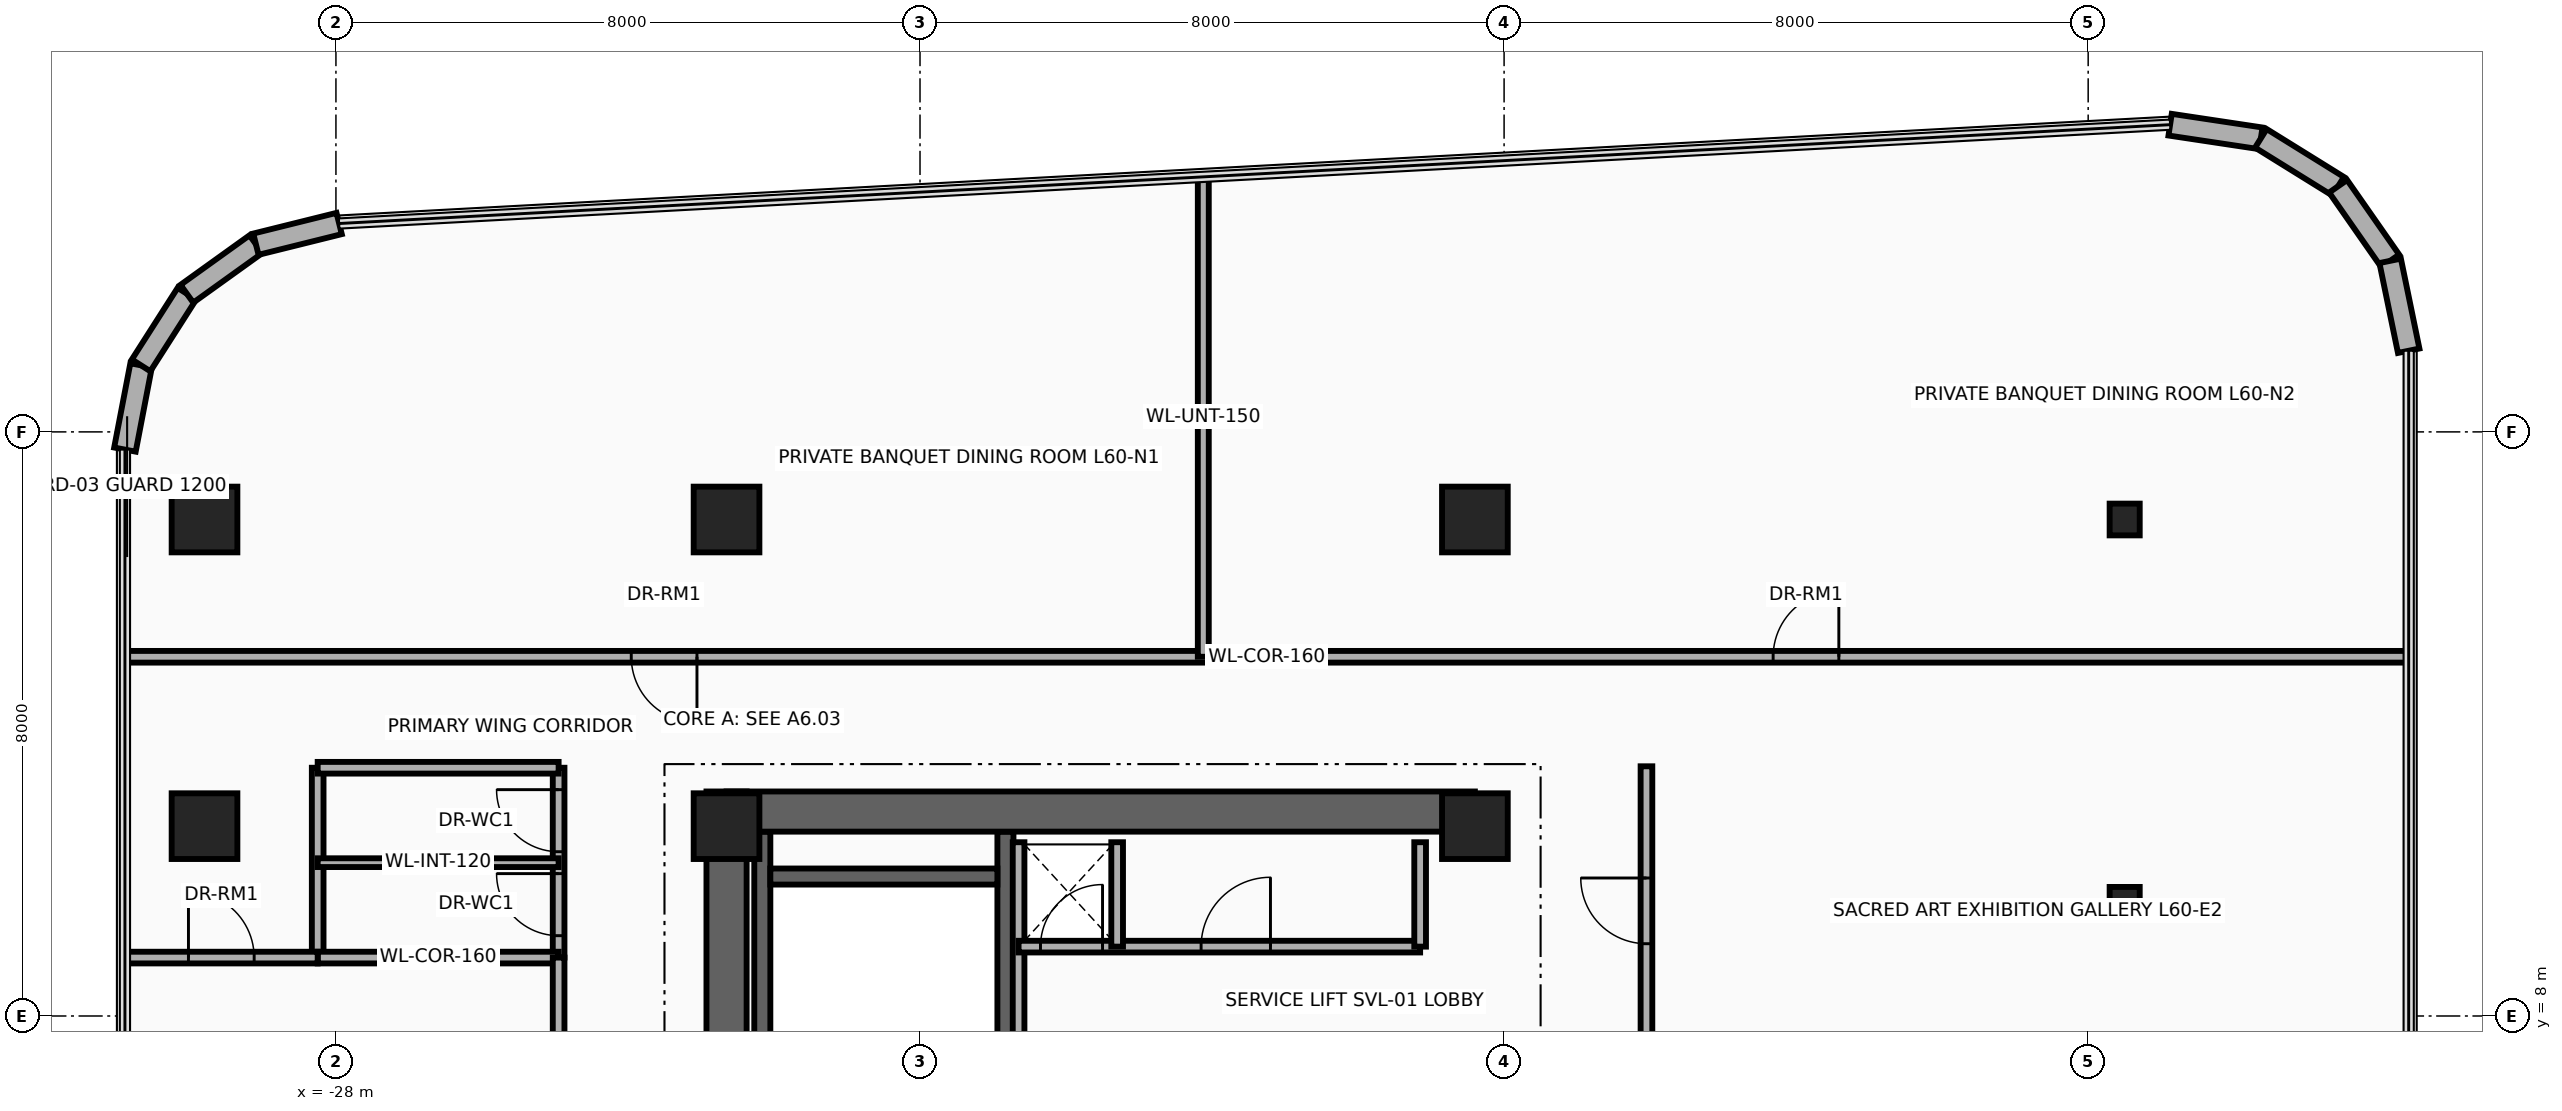
"""IFC4 building model, lengths in metres.
Left out: names, types, materials, properties, quantities, classifications, styles, units other than length and angle.
Written with IfcOpenShell. Run it as: python <this file> out.ifc"""

import sys

from ifc_helpers import new_model, si_unit, direction, frame, frame_2d, origin, origin_2d, place, context, subcontext, project, spatial, rectangle, i_section, extrude, source, transform, mapped, element, fill, save


model = new_model("IFC4")
c1 = context("Model", 3, precision=1e-05, world=origin(), true_north=direction((0.0, 1.0)))
c2 = subcontext(c1, "Body", "Model", "MODEL_VIEW")
j1 = project(units=[si_unit("LENGTHUNIT", "METRE"), si_unit("PLANEANGLEUNIT", "RADIAN")], contexts=[c1])
p1 = place(None, origin())
s1 = spatial("IfcSite", under=j1, at=p1, CompositionType="ELEMENT")
p2 = place(p1, origin())
s2 = spatial("IfcBuilding", under=s1, at=p2, CompositionType="ELEMENT")
p3 = place(p2, frame((0.0, 0.0, 233.5)))
s3 = spatial("IfcBuildingStorey", under=s2, at=p3, CompositionType="ELEMENT", Elevation=233.5)
for number, where, z_axis, x_axis in (
    (1, (-22.16, 1.78, 0.0), (0.0, 0.0, 1.0), (0.0, 1.0, 0.0)),
    (2, (-18.83, 1.78, 0.0), (0.0, 0.0, 1.0), (0.0, 1.0, 0.0)),
):
    element("IfcWall", number, at=place(p3, frame(where, z_axis=z_axis, x_axis=x_axis)), inside=s3, PredefinedType="SHEAR", context=c2, shape_type="SweptSolid", body=[
        extrude(rectangle(XDim=8.745, YDim=0.22, at=frame_2d((4.373, 0.0))), origin(), (0.0, 0.0, 1.0), 3.26),
    ])
p4 = place(p3, frame((-22.05, 9.91, 0.0), z_axis=(0.0, 0.0, 1.0), x_axis=(1.0, 0.0, 0.0)))
e3 = element("IfcWall", 3, at=p4, inside=s3, PredefinedType="SHEAR", context=c2, shape_type="SweptSolid", body=[
    extrude(rectangle(XDim=3.11, YDim=0.22, at=frame_2d((1.555, 0.0))), origin(), (0.0, 0.0, 1.0), 3.26),
])
p5 = place(p3, frame((-22.65, -11.075, 0.0), z_axis=(0.0, 0.0, 1.0), x_axis=(0.0, 1.0, 0.0)))
e4 = element("IfcWall", 4, at=p5, inside=s3, PredefinedType="SHEAR", context=c2, shape_type="SweptSolid", body=[
    extrude(rectangle(XDim=22.15, YDim=0.55, at=frame_2d((11.075, 0.0))), origin(), (0.0, 0.0, 1.0), 3.26),
])
p6 = place(p3, frame((-22.65, 10.8, 0.0), z_axis=(0.0, 0.0, 1.0), x_axis=(1.0, 0.0, 0.0)))
e5 = element("IfcWall", 5, at=p6, inside=s3, PredefinedType="SHEAR", context=c2, shape_type="SweptSolid", body=[
    extrude(rectangle(XDim=10.25, YDim=0.55, at=frame_2d((5.125, 0.0))), origin(), (0.0, 0.0, 1.0), 3.26),
])
m1 = source(origin(), c2, "Body", "SweptSolid", [
    extrude(rectangle(XDim=0.9, YDim=0.9, at=origin_2d()), origin(), (0.0, 0.0, 1.0), 3.5),
])
for number, where, z_axis, x_axis in (
    (6, (-29.8, 10.6, 0.0), (0.0, 0.0, 1.0), (1.0, 0.0, 0.0)),
    (7, (-22.65, 10.6, 0.0), (0.0, 0.0, 1.0), (1.0, 0.0, 0.0)),
    (8, (-12.4, 10.6, 0.0), (0.0, 0.0, 1.0), (1.0, 0.0, 0.0)),
    (9, (-29.8, 14.8, 0.0), (0.0, 0.0, 1.0), (1.0, 0.0, 0.0)),
    (10, (-22.65, 14.8, 0.0), (0.0, 0.0, 1.0), (1.0, 0.0, 0.0)),
    (11, (-12.4, 14.8, 0.0), (0.0, 0.0, 1.0), (1.0, 0.0, 0.0)),
):
    element("IfcColumn", number, at=place(p3, frame(where, z_axis=z_axis, x_axis=x_axis)), inside=s3, PredefinedType="COLUMN", context=c2, shape_type="MappedRepresentation", body=[
        mapped(m1, transform((0.0, 0.0, 0.0), x_axis=(1.0, 0.0, 0.0), y_axis=(0.0, 1.0, 0.0), z_axis=(0.0, 0.0, 1.0), scale=1.0)),
    ])
m2 = source(origin(), c2, "Body", "SweptSolid", [
    extrude(i_section(OverallWidth=0.412, OverallDepth=0.435, WebThickness=0.036, FlangeThickness=0.057, at=origin_2d()), origin(), (0.0, 0.0, 1.0), 3.5),
])
for number, where, z_axis, x_axis in (
    (12, (-3.5, 9.55, 0.0), (0.0, 0.0, 1.0), (1.0, 0.0, 0.0)),
    (13, (-3.5, 14.8, 0.0), (0.0, 0.0, 1.0), (1.0, 0.0, 0.0)),
):
    element("IfcColumn", number, at=place(p3, frame(where, z_axis=z_axis, x_axis=x_axis)), inside=s3, PredefinedType="COLUMN", context=c2, shape_type="MappedRepresentation", body=[
        mapped(m2, transform((0.0, 0.0, 0.0), x_axis=(1.0, 0.0, 0.0), y_axis=(0.0, 1.0, 0.0), z_axis=(0.0, 0.0, 1.0), scale=1.0)),
    ])
p7 = place(p3, frame((-30.89, 15.758, 0.0), z_axis=(0.0, 0.0, 1.0), x_axis=(0.18831542659, 0.982108598938, 0.0)))
e14 = element("IfcWall", 14, at=p7, inside=s3, PredefinedType="SOLIDWALL", context=c2, shape_type="SweptSolid", body=[
    extrude(rectangle(XDim=1.175, YDim=0.3, at=frame_2d((0.587, 0.0))), origin(), (0.0, 0.0, 1.0), 3.26),
])
p8 = place(p3, frame((-30.669, 16.911, 0.0), z_axis=(0.0, 0.0, 1.0), x_axis=(0.538678781902, 0.84251122837, 0.0)))
e15 = element("IfcWall", 15, at=p8, inside=s3, PredefinedType="SOLIDWALL", context=c2, shape_type="SweptSolid", body=[
    extrude(rectangle(XDim=1.164, YDim=0.3, at=frame_2d((0.582, 0.0))), origin(), (0.0, 0.0, 1.0), 3.26),
])
p9 = place(p3, frame((-30.042, 17.892, 0.0), z_axis=(0.0, 0.0, 1.0), x_axis=(0.812313539683, 0.583220981487, 0.0)))
e16 = element("IfcWall", 16, at=p9, inside=s3, PredefinedType="SOLIDWALL", context=c2, shape_type="SweptSolid", body=[
    extrude(rectangle(XDim=1.164, YDim=0.3, at=frame_2d((0.582, 0.0))), origin(), (0.0, 0.0, 1.0), 3.26),
])
p10 = place(p3, frame((-29.096, 18.571, 0.0), z_axis=(0.0, 0.0, 1.0), x_axis=(0.97050812798, 0.241068400098, 0.0)))
e17 = element("IfcWall", 17, at=p10, inside=s3, PredefinedType="SOLIDWALL", context=c2, shape_type="SweptSolid", body=[
    extrude(rectangle(XDim=1.175, YDim=0.3, at=frame_2d((0.587, 0.0))), origin(), (0.0, 0.0, 1.0), 3.26),
])
p11 = place(p3, frame((-2.878, 20.208, 0.0), z_axis=(0.0, 0.0, 1.0), x_axis=(0.988902138571, -0.148568369208, 0.0)))
e18 = element("IfcWall", 18, at=p11, inside=s3, PredefinedType="SOLIDWALL", context=c2, shape_type="SweptSolid", body=[
    extrude(rectangle(XDim=1.257, YDim=0.3, at=frame_2d((0.628, 0.0))), origin(), (0.0, 0.0, 1.0), 3.26),
])
p12 = place(p3, frame((-1.635, 20.021, 0.0), z_axis=(0.0, 0.0, 1.0), x_axis=(0.849646224094, -0.52735310171, 0.0)))
e19 = element("IfcWall", 19, at=p12, inside=s3, PredefinedType="SOLIDWALL", context=c2, shape_type="SweptSolid", body=[
    extrude(rectangle(XDim=1.245, YDim=0.3, at=frame_2d((0.623, 0.0))), origin(), (0.0, 0.0, 1.0), 3.26),
])
p13 = place(p3, frame((-0.576, 19.364, 0.0), z_axis=(0.0, 0.0, 1.0), x_axis=(0.572304219931, -0.820041389107, 0.0)))
e20 = element("IfcWall", 20, at=p13, inside=s3, PredefinedType="SOLIDWALL", context=c2, shape_type="SweptSolid", body=[
    extrude(rectangle(XDim=1.246, YDim=0.3, at=frame_2d((0.623, 0.0))), origin(), (0.0, 0.0, 1.0), 3.26),
])
p14 = place(p3, frame((0.136, 18.343, 0.0), z_axis=(0.0, 0.0, 1.0), x_axis=(0.201603599025, -0.979467196419, 0.0)))
e21 = element("IfcWall", 21, at=p14, inside=s3, PredefinedType="SOLIDWALL", context=c2, shape_type="SweptSolid", body=[
    extrude(rectangle(XDim=1.257, YDim=0.3, at=frame_2d((0.628, 0.0))), origin(), (0.0, 0.0, 1.0), 3.26),
])
p15 = place(p3, frame((-18.65, 7.45, 0.0), z_axis=(0.0, 0.0, 1.0), x_axis=(0.0, 1.0, 0.0)))
e22 = element("IfcWall", 22, at=p15, inside=s3, PredefinedType="PARTITIONING", context=c2, shape_type="SweptSolid", body=[
    extrude(rectangle(XDim=2.93, YDim=0.16, at=frame_2d((1.465, 0.0))), origin(), (0.0, 0.0, 1.0), 3.26),
])
p16 = place(p3, frame((-18.65, 8.95, 0.0), z_axis=(0.0, 0.0, 1.0), x_axis=(1.0, 0.0, 0.0)))
e23 = element("IfcWall", 23, at=p16, inside=s3, PredefinedType="PARTITIONING", context=c2, shape_type="SweptSolid", body=[
    extrude(rectangle(XDim=5.5, YDim=0.16, at=frame_2d((2.75, 0.0))), origin(), (0.0, 0.0, 1.0), 3.26),
])
p17 = place(p16, frame((0.3, 0.0, 0.0)))
e24 = element("IfcOpeningElement", 24, at=p17, cuts=e23, PredefinedType="OPENING", context=c2, shape_type="SweptSolid", body=[
    extrude(rectangle(XDim=0.85, YDim=2.05, at=frame_2d((0.425, 1.025))), frame((0.0, 0.095, 0.0), z_axis=(0.0, -1.0, 0.0), x_axis=(1.0, 0.0, 0.0)), (0.0, 0.0, 1.0), 0.19),
])
p18 = place(p16, frame((2.5, 0.0, 0.0)))
e25 = element("IfcOpeningElement", 25, at=p18, cuts=e23, PredefinedType="OPENING", context=c2, shape_type="SweptSolid", body=[
    extrude(rectangle(XDim=0.95, YDim=2.15, at=frame_2d((0.475, 1.075))), frame((0.0, 0.095, 0.0), z_axis=(0.0, -1.0, 0.0), x_axis=(1.0, 0.0, 0.0)), (0.0, 0.0, 1.0), 0.19),
])
for number, where, z_axis, x_axis in (
    (26, (-13.15, 8.95, 0.0), (0.0, 0.0, 1.0), (0.0, 1.0, 0.0)),
    (27, (-17.3, 8.95, 0.0), (0.0, 0.0, 1.0), (0.0, 1.0, 0.0)),
):
    element("IfcWall", number, at=place(p3, frame(where, z_axis=z_axis, x_axis=x_axis)), inside=s3, PredefinedType="PARTITIONING", context=c2, shape_type="SweptSolid", body=[
        extrude(rectangle(XDim=1.43, YDim=0.16, at=frame_2d((0.715, 0.0))), origin(), (0.0, 0.0, 1.0), 3.26),
    ])
p19 = place(p3, frame((-28.25, 8.8, 0.0), z_axis=(0.0, 0.0, 1.0), x_axis=(0.0, 1.0, 0.0)))
e28 = element("IfcWall", 28, at=p19, inside=s3, PredefinedType="PARTITIONING", context=c2, shape_type="SweptSolid", body=[
    extrude(rectangle(XDim=2.6, YDim=0.16, at=frame_2d((1.3, 0.0))), origin(), (0.0, 0.0, 1.0), 2.544),
])
p20 = place(p3, frame((-24.95, 8.8, 0.0), z_axis=(0.0, 0.0, 1.0), x_axis=(0.0, 1.0, 0.0)))
e29 = element("IfcWall", 29, at=p20, inside=s3, PredefinedType="PARTITIONING", context=c2, shape_type="SweptSolid", body=[
    extrude(rectangle(XDim=2.6, YDim=0.16, at=frame_2d((1.3, 0.0))), origin(), (0.0, 0.0, 1.0), 2.544),
])
p21 = place(p20, frame((0.3, 0.0, 0.0)))
e30 = element("IfcOpeningElement", 30, at=p21, cuts=e29, PredefinedType="OPENING", context=c2, shape_type="SweptSolid", body=[
    extrude(rectangle(XDim=0.85, YDim=2.1, at=frame_2d((0.425, 1.05))), frame((0.0, 0.095, 0.0), z_axis=(0.0, -1.0, 0.0), x_axis=(1.0, 0.0, 0.0)), (0.0, 0.0, 1.0), 0.19),
])
p22 = place(p20, frame((1.45, 0.0, 0.0)))
e31 = element("IfcOpeningElement", 31, at=p22, cuts=e29, PredefinedType="OPENING", context=c2, shape_type="SweptSolid", body=[
    extrude(rectangle(XDim=0.85, YDim=2.1, at=frame_2d((0.425, 1.05))), frame((0.0, 0.095, 0.0), z_axis=(0.0, -1.0, 0.0), x_axis=(1.0, 0.0, 0.0)), (0.0, 0.0, 1.0), 0.19),
])
for number, where, z_axis, x_axis in (
    (32, (-28.25, 8.8, 0.0), (0.0, 0.0, 1.0), (1.0, 0.0, 0.0)),
    (33, (-28.25, 11.4, 0.0), (0.0, 0.0, 1.0), (1.0, 0.0, 0.0)),
):
    element("IfcWall", number, at=place(p3, frame(where, z_axis=z_axis, x_axis=x_axis)), inside=s3, PredefinedType="PARTITIONING", context=c2, shape_type="SweptSolid", body=[
        extrude(rectangle(XDim=3.3, YDim=0.16, at=frame_2d((1.65, 0.0))), origin(), (0.0, 0.0, 1.0), 3.26),
    ])
p23 = place(p3, frame((-28.25, 10.1, 0.0), z_axis=(0.0, 0.0, 1.0), x_axis=(1.0, 0.0, 0.0)))
e34 = element("IfcWall", 34, at=p23, inside=s3, PredefinedType="PARTITIONING", context=c2, shape_type="SweptSolid", body=[
    extrude(rectangle(XDim=3.3, YDim=0.12, at=frame_2d((1.65, 0.0))), origin(), (0.0, 0.0, 1.0), 3.26),
])
p24 = place(p3, frame((-24.95, -17.54, 0.0), z_axis=(0.0, 0.0, 1.0), x_axis=(0.0, 1.0, 0.0)))
e35 = element("IfcWall", 35, at=p24, inside=s3, PredefinedType="PARTITIONING", context=c2, shape_type="SweptSolid", body=[
    extrude(rectangle(XDim=26.34, YDim=0.16, at=frame_2d((13.17, 0.0))), origin(), (0.0, 0.0, 1.0), 2.544),
])
p25 = place(p24, frame((3.49, 0.0, 0.0)))
e36 = element("IfcOpeningElement", 36, at=p25, cuts=e35, PredefinedType="OPENING", context=c2, shape_type="SweptSolid", body=[
    extrude(rectangle(XDim=1.8, YDim=2.15, at=frame_2d((0.9, 1.075))), frame((0.0, 0.095, 0.0), z_axis=(0.0, -1.0, 0.0), x_axis=(1.0, 0.0, 0.0)), (0.0, 0.0, 1.0), 0.19),
])
p26 = place(p24, frame((12.72, 0.0, 0.0)))
e37 = element("IfcOpeningElement", 37, at=p26, cuts=e35, PredefinedType="OPENING", context=c2, shape_type="SweptSolid", body=[
    extrude(rectangle(XDim=0.9, YDim=2.1, at=frame_2d((0.45, 1.05))), frame((0.0, 0.095, 0.0), z_axis=(0.0, -1.0, 0.0), x_axis=(1.0, 0.0, 0.0)), (0.0, 0.0, 1.0), 0.19),
])
p27 = place(p24, frame((21.5, 0.0, 0.0)))
e38 = element("IfcOpeningElement", 38, at=p27, cuts=e35, PredefinedType="OPENING", context=c2, shape_type="SweptSolid", body=[
    extrude(rectangle(XDim=0.9, YDim=2.1, at=frame_2d((0.45, 1.05))), frame((0.0, 0.095, 0.0), z_axis=(0.0, -1.0, 0.0), x_axis=(1.0, 0.0, 0.0)), (0.0, 0.0, 1.0), 0.19),
])
p28 = place(p3, frame((-30.89, 8.8, 0.0), z_axis=(0.0, 0.0, 1.0), x_axis=(1.0, 0.0, 0.0)))
e39 = element("IfcWall", 39, at=p28, inside=s3, PredefinedType="PARTITIONING", context=c2, shape_type="SweptSolid", body=[
    extrude(rectangle(XDim=2.64, YDim=0.16, at=frame_2d((1.32, 0.0))), origin(), (0.0, 0.0, 1.0), 2.706),
])
p29 = place(p28, frame((0.87, 0.0, 0.0)))
e40 = element("IfcOpeningElement", 40, at=p29, cuts=e39, PredefinedType="OPENING", context=c2, shape_type="SweptSolid", body=[
    extrude(rectangle(XDim=0.9, YDim=2.1, at=frame_2d((0.45, 1.05))), frame((0.0, 0.095, 0.0), z_axis=(0.0, -1.0, 0.0), x_axis=(1.0, 0.0, 0.0)), (0.0, 0.0, 1.0), 0.19),
])
p30 = place(p3, frame((-30.89, 12.92, 0.0), z_axis=(0.0, 0.0, 1.0), x_axis=(1.0, 0.0, 0.0)))
e41 = element("IfcWall", 41, at=p30, inside=s3, PredefinedType="PARTITIONING", context=c2, shape_type="SweptSolid", body=[
    extrude(rectangle(XDim=31.28, YDim=0.16, at=frame_2d((15.64, 0.0))), origin(), (0.0, 0.0, 1.0), 2.634),
])
p31 = place(p30, frame((6.935, 0.0, 0.0)))
e42 = element("IfcOpeningElement", 42, at=p31, cuts=e41, PredefinedType="OPENING", context=c2, shape_type="SweptSolid", body=[
    extrude(rectangle(XDim=0.9, YDim=2.1, at=frame_2d((0.45, 1.05))), frame((0.0, 0.095, 0.0), z_axis=(0.0, -1.0, 0.0), x_axis=(1.0, 0.0, 0.0)), (0.0, 0.0, 1.0), 0.19),
])
p32 = place(p30, frame((22.575, 0.0, 0.0)))
e43 = element("IfcOpeningElement", 43, at=p32, cuts=e41, PredefinedType="OPENING", context=c2, shape_type="SweptSolid", body=[
    extrude(rectangle(XDim=0.9, YDim=2.1, at=frame_2d((0.45, 1.05))), frame((0.0, 0.095, 0.0), z_axis=(0.0, -1.0, 0.0), x_axis=(1.0, 0.0, 0.0)), (0.0, 0.0, 1.0), 0.19),
])
p33 = place(p3, frame((-16.12, 12.92, 0.0), z_axis=(0.0, 0.0, 1.0), x_axis=(0.0, 1.0, 0.0)))
e44 = element("IfcWall", 44, at=p33, inside=s3, PredefinedType="PARTITIONING", context=c2, shape_type="SweptSolid", body=[
    extrude(rectangle(XDim=6.573, YDim=0.15, at=frame_2d((3.287, 0.0))), origin(), (0.0, 0.0, 1.0), 2.544),
])
p34 = place(p3, frame((-10.05, 3.5, 0.0), z_axis=(0.0, 0.0, 1.0), x_axis=(0.0, 1.0, 0.0)))
e45 = element("IfcWall", 45, at=p34, inside=s3, PredefinedType="PARTITIONING", context=c2, shape_type="SweptSolid", body=[
    extrude(rectangle(XDim=7.92, YDim=0.16, at=frame_2d((3.96, 0.0))), origin(), (0.0, 0.0, 1.0), 2.544),
])
p35 = place(p34, frame((1.53, 0.0, 0.0)))
e46 = element("IfcOpeningElement", 46, at=p35, cuts=e45, PredefinedType="OPENING", context=c2, shape_type="SweptSolid", body=[
    extrude(rectangle(XDim=0.9, YDim=2.1, at=frame_2d((0.45, 1.05))), frame((0.0, 0.095, 0.0), z_axis=(0.0, -1.0, 0.0), x_axis=(1.0, 0.0, 0.0)), (0.0, 0.0, 1.0), 0.19),
])
p36 = place(p34, frame((5.49, 0.0, 0.0)))
e47 = element("IfcOpeningElement", 47, at=p36, cuts=e45, PredefinedType="OPENING", context=c2, shape_type="SweptSolid", body=[
    extrude(rectangle(XDim=0.9, YDim=2.1, at=frame_2d((0.45, 1.05))), frame((0.0, 0.095, 0.0), z_axis=(0.0, -1.0, 0.0), x_axis=(1.0, 0.0, 0.0)), (0.0, 0.0, 1.0), 0.19),
])
p37 = place(p17, origin())
e48 = element("IfcDoor", 48, at=p37, inside=s3, OperationType="SINGLE_SWING_LEFT", PredefinedType="DOOR", context=c2, shape_type="SweptSolid", body=[
    extrude(rectangle(XDim=0.85, YDim=2.05, at=frame_2d((0.425, 1.025))), frame((0.0, 0.025, 0.0), z_axis=(0.0, -1.0, 0.0), x_axis=(1.0, 0.0, 0.0)), (0.0, 0.0, 1.0), 0.05),
])
fill(e24, e48)
p38 = place(p18, origin())
e49 = element("IfcDoor", 49, at=p38, inside=s3, OperationType="SINGLE_SWING_RIGHT", PredefinedType="DOOR", context=c2, shape_type="SweptSolid", body=[
    extrude(rectangle(XDim=0.95, YDim=2.15, at=frame_2d((0.475, 1.075))), frame((0.0, 0.025, 0.0), z_axis=(0.0, -1.0, 0.0), x_axis=(1.0, 0.0, 0.0)), (0.0, 0.0, 1.0), 0.05),
])
fill(e25, e49)
p39 = place(p21, origin())
e50 = element("IfcDoor", 50, at=p39, inside=s3, OperationType="SINGLE_SWING_RIGHT", PredefinedType="DOOR", context=c2, shape_type="SweptSolid", body=[
    extrude(rectangle(XDim=0.85, YDim=2.1, at=frame_2d((0.425, 1.05))), frame((0.0, 0.025, 0.0), z_axis=(0.0, -1.0, 0.0), x_axis=(1.0, 0.0, 0.0)), (0.0, 0.0, 1.0), 0.05),
])
fill(e30, e50)
p40 = place(p22, origin())
e51 = element("IfcDoor", 51, at=p40, inside=s3, OperationType="SINGLE_SWING_LEFT", PredefinedType="DOOR", context=c2, shape_type="SweptSolid", body=[
    extrude(rectangle(XDim=0.85, YDim=2.1, at=frame_2d((0.425, 1.05))), frame((0.0, 0.025, 0.0), z_axis=(0.0, -1.0, 0.0), x_axis=(1.0, 0.0, 0.0)), (0.0, 0.0, 1.0), 0.05),
])
fill(e31, e51)
p41 = place(p29, origin())
e52 = element("IfcDoor", 52, at=p41, inside=s3, OperationType="SINGLE_SWING_RIGHT", PredefinedType="DOOR", context=c2, shape_type="SweptSolid", body=[
    extrude(rectangle(XDim=0.9, YDim=2.1, at=frame_2d((0.45, 1.05))), frame((0.0, 0.025, 0.0), z_axis=(0.0, -1.0, 0.0), x_axis=(1.0, 0.0, 0.0)), (0.0, 0.0, 1.0), 0.05),
])
fill(e40, e52)
p42 = place(p31, frame((0.9, 0.0, 0.0), z_axis=(0.0, 0.0, 1.0), x_axis=(-1.0, 0.0, 0.0)))
e53 = element("IfcDoor", 53, at=p42, inside=s3, OperationType="SINGLE_SWING_LEFT", PredefinedType="DOOR", context=c2, shape_type="SweptSolid", body=[
    extrude(rectangle(XDim=0.9, YDim=2.1, at=frame_2d((0.45, 1.05))), frame((0.0, 0.025, 0.0), z_axis=(0.0, -1.0, 0.0), x_axis=(1.0, 0.0, 0.0)), (0.0, 0.0, 1.0), 0.05),
])
fill(e42, e53)
p43 = place(p32, origin())
e54 = element("IfcDoor", 54, at=p43, inside=s3, OperationType="SINGLE_SWING_RIGHT", PredefinedType="DOOR", context=c2, shape_type="SweptSolid", body=[
    extrude(rectangle(XDim=0.9, YDim=2.1, at=frame_2d((0.45, 1.05))), frame((0.0, 0.025, 0.0), z_axis=(0.0, -1.0, 0.0), x_axis=(1.0, 0.0, 0.0)), (0.0, 0.0, 1.0), 0.05),
])
fill(e43, e54)
p44 = place(p36, origin())
e55 = element("IfcDoor", 55, at=p44, inside=s3, OperationType="SINGLE_SWING_RIGHT", PredefinedType="DOOR", context=c2, shape_type="SweptSolid", body=[
    extrude(rectangle(XDim=0.9, YDim=2.1, at=frame_2d((0.45, 1.05))), frame((0.0, 0.025, 0.0), z_axis=(0.0, -1.0, 0.0), x_axis=(1.0, 0.0, 0.0)), (0.0, 0.0, 1.0), 0.05),
])
fill(e47, e55)
save(model, sys.argv[1])
